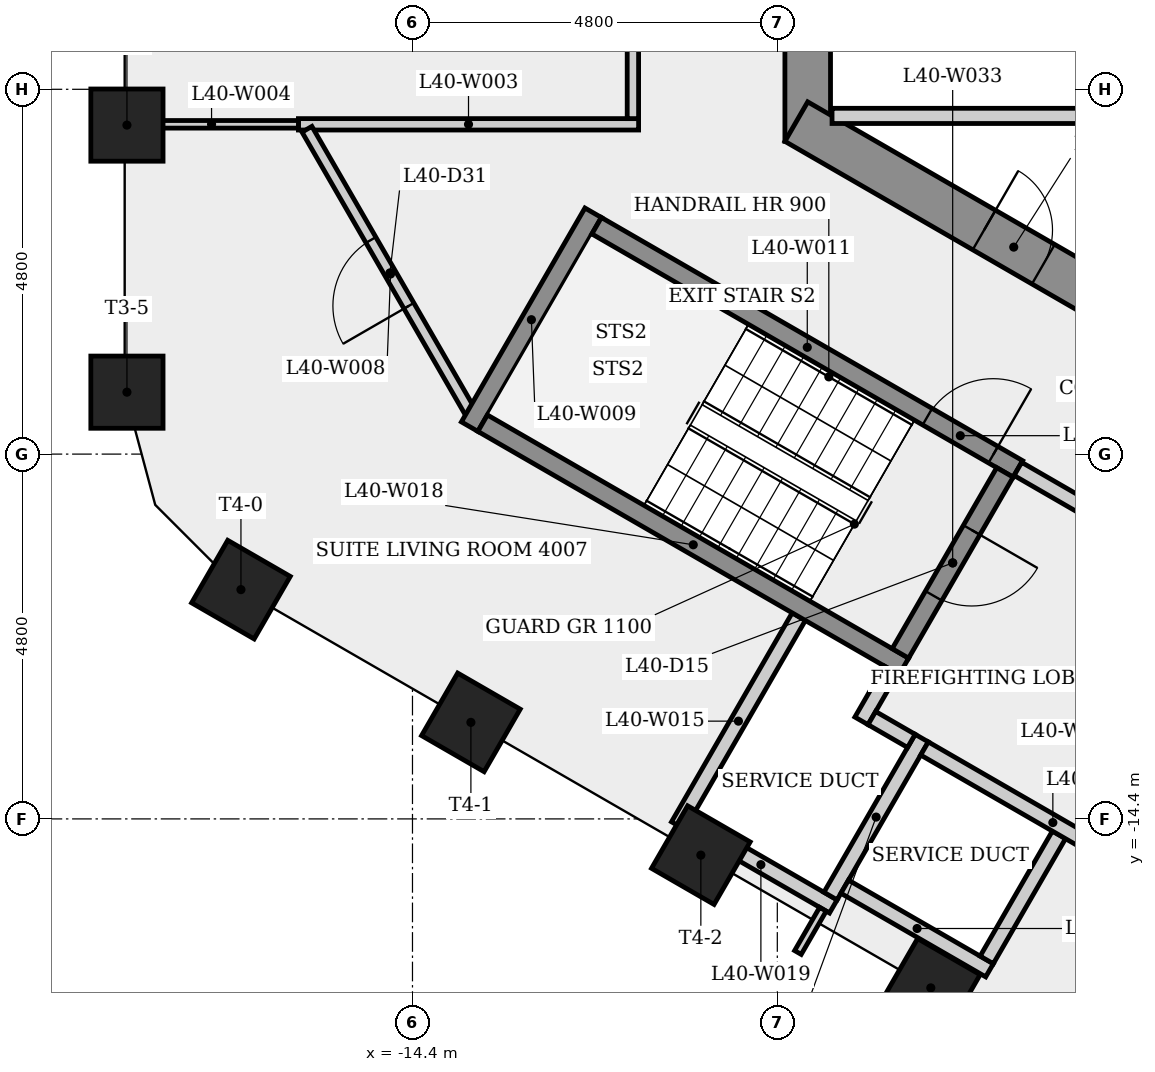
"""IFC4 building model, lengths in metres.
Left out: names, types, materials, properties, quantities, classifications, styles, units other than length and angle.
Written with IfcOpenShell. Run it as: python <this file> out.ifc"""

import sys

from ifc_helpers import new_model, si_unit, direction, frame, frame_2d, origin, origin_2d, place, context, subcontext, project, spatial, rectangle, extrude, element, fill, save


model = new_model("IFC4")
c1 = context("Model", 3, precision=1e-05, world=origin(), true_north=direction((0.0, 1.0)))
c2 = subcontext(c1, "Body", "Model", "MODEL_VIEW")
j1 = project(units=[si_unit("LENGTHUNIT", "METRE"), si_unit("PLANEANGLEUNIT", "RADIAN")], contexts=[c1])
p1 = place(None, origin())
s1 = spatial("IfcSite", under=j1, at=p1, CompositionType="ELEMENT")
p2 = place(p1, origin())
s2 = spatial("IfcBuilding", under=s1, at=p2, CompositionType="ELEMENT")
p3 = place(p2, frame((0.0, 0.0, 152.7)))
s3 = spatial("IfcBuildingStorey", under=s2, at=p3, CompositionType="ELEMENT", Elevation=152.7)
p4 = place(p3, frame((-9.2, 5.485, 0.0), z_axis=(0.0, 0.0, 1.0), x_axis=(0.0, -1.0, 0.0)))
e1 = element("IfcWall", 1, at=p4, inside=s3, PredefinedType="SHEAR", context=c2, shape_type="SweptSolid", body=[
    extrude(rectangle(XDim=10.97, YDim=0.6, at=frame_2d((5.485, 0.0))), origin(), (0.0, 0.0, 1.0), 3.4),
])
p5 = place(p4, frame((8.516, 0.0, 0.0)))
e2 = element("IfcOpeningElement", 2, at=p5, cuts=e1, PredefinedType="OPENING", context=c2, shape_type="SweptSolid", body=[
    extrude(rectangle(XDim=0.9, YDim=2.1, at=frame_2d((0.45, 1.05))), frame((0.0, 0.31, 0.0), z_axis=(0.0, -1.0, 0.0), x_axis=(1.0, 0.0, 0.0)), (0.0, 0.0, 1.0), 0.62),
])
p6 = place(p4, frame((4.685, 0.0, 0.0)))
e3 = element("IfcOpeningElement", 3, at=p6, cuts=e1, PredefinedType="OPENING", context=c2, shape_type="SweptSolid", body=[
    extrude(rectangle(XDim=1.6, YDim=2.1, at=frame_2d((0.8, 1.05))), frame((0.0, 0.31, 0.0), z_axis=(0.0, -1.0, 0.0), x_axis=(1.0, 0.0, 0.0)), (0.0, 0.0, 1.0), 0.62),
])
p7 = place(p3, frame((-9.35, -5.225, 0.0), z_axis=(0.0, 0.0, 1.0), x_axis=(0.866023993627, -0.500002442456, 0.0)))
e4 = element("IfcWall", 4, at=p7, inside=s3, PredefinedType="SHEAR", context=c2, shape_type="SweptSolid", body=[
    extrude(rectangle(XDim=10.97, YDim=0.6, at=frame_2d((5.485, 0.0))), origin(), (0.0, 0.0, 1.0), 3.4),
])
p8 = place(p7, frame((2.853, 0.0, 0.0)))
e5 = element("IfcOpeningElement", 5, at=p8, cuts=e4, PredefinedType="OPENING", context=c2, shape_type="SweptSolid", body=[
    extrude(rectangle(XDim=0.9, YDim=2.1, at=frame_2d((0.45, 1.05))), frame((0.0, 0.31, 0.0), z_axis=(0.0, -1.0, 0.0), x_axis=(1.0, 0.0, 0.0)), (0.0, 0.0, 1.0), 0.62),
])
for number, where, z_axis, x_axis in (
    (6, (-18.157, -5.271, 0.0), (0.0, 0.0, 1.0), (-1.0, 0.0, 0.0)),
    (7, (-18.157, -8.785, 0.0), (0.0, 0.0, 1.0), (-1.0, 0.0, 0.0)),
    (8, (-16.657, -11.383, 0.0), (0.0, 0.0, 1.0), (-0.5, -0.866, 0.0)),
    (9, (-13.631, -13.13, 0.0), (0.0, 0.0, 1.0), (-0.5, -0.866, 0.0)),
    (10, (-10.606, -14.877, 0.0), (0.0, 0.0, 1.0), (-0.5, -0.866, 0.0)),
    (11, (-7.581, -16.623, 0.0), (0.0, 0.0, 1.0), (-0.5, -0.866, 0.0)),
):
    element("IfcColumn", number, at=place(p3, frame(where, z_axis=z_axis, x_axis=x_axis)), inside=s3, PredefinedType="COLUMN", context=c2, shape_type="SweptSolid", body=[
        extrude(rectangle(XDim=0.95, YDim=0.95, at=origin_2d()), origin(), (0.0, 0.0, 1.0), 3.4),
    ])
p9 = place(p3, frame((-15.901, -5.261, 0.0), z_axis=(0.0, 0.0, 1.0), x_axis=(1.0, 0.0, 0.0)))
e12 = element("IfcWall", 12, at=p9, inside=s3, PredefinedType="PARTITIONING", context=c2, shape_type="SweptSolid", body=[
    extrude(rectangle(XDim=4.476, YDim=0.15, at=frame_2d((2.238, 0.0))), origin(), (0.0, 0.0, 1.0), 3.05),
])
p10 = place(p3, frame((-15.901, -5.261, 0.0), z_axis=(0.0, 0.0, 1.0), x_axis=(-1.0, 0.0, 0.0)))
e13 = element("IfcWall", 13, at=p10, inside=s3, PredefinedType="PARTITIONING", context=c2, shape_type="SweptSolid", body=[
    extrude(rectangle(XDim=2.286, YDim=0.1, at=frame_2d((1.143, 0.0))), origin(), (0.0, 0.0, 1.0), 3.05),
])
p11 = place(p3, frame((-13.588, -9.136, 0.0), z_axis=(0.0, 0.0, 1.0), x_axis=(-0.50001224981, 0.866018331238, 0.0)))
e14 = element("IfcWall", 14, at=p11, inside=s3, PredefinedType="PARTITIONING", context=c2, shape_type="SweptSolid", body=[
    extrude(rectangle(XDim=4.4, YDim=0.15, at=frame_2d((2.2, 0.0))), origin(), (0.0, 0.0, 1.0), 3.05),
])
p12 = place(p11, frame((1.717, 0.0, 0.0)))
e15 = element("IfcOpeningElement", 15, at=p12, cuts=e14, PredefinedType="OPENING", context=c2, shape_type="SweptSolid", body=[
    extrude(rectangle(XDim=1.0, YDim=2.1, at=frame_2d((0.5, 1.05))), frame((0.0, 0.085, 0.0), z_axis=(0.0, -1.0, 0.0), x_axis=(1.0, 0.0, 0.0)), (0.0, 0.0, 1.0), 0.17),
])
p13 = place(p3, frame((-13.648, -9.239, 0.0), z_axis=(0.0, 0.0, 1.0), x_axis=(0.500017246033, 0.866015446554, 0.0)))
e16 = element("IfcWall", 16, at=p13, inside=s3, PredefinedType="SHEAR", context=c2, shape_type="SweptSolid", body=[
    extrude(rectangle(XDim=3.25, YDim=0.25, at=frame_2d((1.625, 0.0))), origin(), (0.0, 0.0, 1.0), 3.05),
])
p14 = place(p3, frame((-11.977, -6.595, 0.0), z_axis=(0.0, 0.0, 1.0), x_axis=(0.866025499775, -0.499999833739, 0.0)))
e17 = element("IfcWall", 17, at=p14, inside=s3, PredefinedType="SHEAR", context=c2, shape_type="SweptSolid", body=[
    extrude(rectangle(XDim=6.4, YDim=0.25, at=frame_2d((3.2, 0.0))), origin(), (0.0, 0.0, 1.0), 3.05),
])
p15 = place(p14, frame((5.025, 0.0, 0.0)))
e18 = element("IfcOpeningElement", 18, at=p15, cuts=e17, PredefinedType="OPENING", context=c2, shape_type="SweptSolid", body=[
    extrude(rectangle(XDim=1.0, YDim=2.1, at=frame_2d((0.5, 1.05))), frame((0.0, 0.135, 0.0), z_axis=(0.0, -1.0, 0.0), x_axis=(1.0, 0.0, 0.0)), (0.0, 0.0, 1.0), 0.27),
])
p16 = place(p3, frame((-11.5, -5.186, 0.0), z_axis=(0.0, 0.0, 1.0), x_axis=(0.0, 1.0, 0.0)))
e19 = element("IfcWall", 19, at=p16, inside=s3, PredefinedType="PARTITIONING", context=c2, shape_type="SweptSolid", body=[
    extrude(rectangle(XDim=10.521, YDim=0.15, at=frame_2d((5.261, 0.0))), origin(), (0.0, 0.0, 1.0), 3.05),
])
p17 = place(p16, frame((9.146, 0.0, 0.0)))
e20 = element("IfcOpeningElement", 20, at=p17, cuts=e19, PredefinedType="OPENING", context=c2, shape_type="SweptSolid", body=[
    extrude(rectangle(XDim=0.9, YDim=2.1, at=frame_2d((0.45, 1.05))), frame((0.0, 0.085, 0.0), z_axis=(0.0, -1.0, 0.0), x_axis=(1.0, 0.0, 0.0)), (0.0, 0.0, 1.0), 0.17),
])
p18 = place(p16, frame((2.955, 0.0, 0.0)))
e21 = element("IfcOpeningElement", 21, at=p18, cuts=e19, PredefinedType="OPENING", context=c2, shape_type="SweptSolid", body=[
    extrude(rectangle(XDim=1.0, YDim=2.1, at=frame_2d((0.5, 1.05))), frame((0.0, 0.085, 0.0), z_axis=(0.0, -1.0, 0.0), x_axis=(1.0, 0.0, 0.0)), (0.0, 0.0, 1.0), 0.17),
])
p19 = place(p3, frame((-10.905, -14.489, 0.0), z_axis=(0.0, 0.0, 1.0), x_axis=(0.499959856469, 0.866048579423, 0.0)))
e22 = element("IfcWall", 22, at=p19, inside=s3, PredefinedType="PLUMBINGWALL", context=c2, shape_type="SweptSolid", body=[
    extrude(rectangle(XDim=3.175, YDim=0.2, at=frame_2d((1.587, 0.0))), origin(), (0.0, 0.0, 1.0), 3.05),
])
p20 = place(p3, frame((-13.477, -9.193, 0.0), z_axis=(0.0, 0.0, 1.0), x_axis=(0.866025499775, -0.499999833739, 0.0)))
e23 = element("IfcWall", 23, at=p20, inside=s3, PredefinedType="SHEAR", context=c2, shape_type="SweptSolid", body=[
    extrude(rectangle(XDim=6.4, YDim=0.25, at=frame_2d((3.2, 0.0))), origin(), (0.0, 0.0, 1.0), 3.05),
])
p21 = place(p3, frame((-8.863, -15.552, 0.0), z_axis=(0.0, 0.0, 1.0), x_axis=(-0.866035918664, 0.499981787252, 0.0)))
e24 = element("IfcWall", 24, at=p21, inside=s3, PredefinedType="PLUMBINGWALL", context=c2, shape_type="SweptSolid", body=[
    extrude(rectangle(XDim=2.2, YDim=0.2, at=frame_2d((1.1, 0.0))), origin(), (0.0, 0.0, 1.0), 3.05),
])
p22 = place(p3, frame((-9.0, -15.588, 0.0), z_axis=(0.0, 0.0, 1.0), x_axis=(-0.500011643316, -0.866018681408, 0.0)))
e25 = element("IfcWall", 25, at=p22, inside=s3, PredefinedType="PARTITIONING", context=c2, shape_type="SweptSolid", body=[
    extrude(rectangle(XDim=0.658, YDim=0.1, at=frame_2d((0.329, 0.0))), origin(), (0.0, 0.0, 1.0), 3.05),
])
p23 = place(p3, frame((-8.88, -5.15, 0.0), z_axis=(0.0, 0.0, 1.0), x_axis=(1.0, 0.0, 0.0)))
e26 = element("IfcWall", 26, at=p23, inside=s3, PredefinedType="PARTITIONING", context=c2, shape_type="SweptSolid", body=[
    extrude(rectangle(XDim=11.205, YDim=0.2, at=frame_2d((5.603, 0.0))), origin(), (0.0, 0.0, 1.0), 3.05),
])
p24 = place(p3, frame((-8.493, -13.11, 0.0), z_axis=(0.0, 0.0, 1.0), x_axis=(0.500067724834, 0.865986299303, 0.0)))
e27 = element("IfcWall", 27, at=p24, inside=s3, PredefinedType="PLUMBINGWALL", context=c2, shape_type="SweptSolid", body=[
    extrude(rectangle(XDim=0.775, YDim=0.2, at=frame_2d((0.388, 0.0))), origin(), (0.0, 0.0, 1.0), 3.05),
])
p25 = place(p3, frame((-7.7, -13.337, 0.0), z_axis=(0.0, 0.0, 1.0), x_axis=(-0.500001309137, -0.866024647952, 0.0)))
e28 = element("IfcWall", 28, at=p25, inside=s3, PredefinedType="PLUMBINGWALL", context=c2, shape_type="SweptSolid", body=[
    extrude(rectangle(XDim=2.4, YDim=0.2, at=frame_2d((1.2, 0.0))), origin(), (0.0, 0.0, 1.0), 3.05),
])
p26 = place(p3, frame((-7.836, -13.373, 0.0), z_axis=(0.0, 0.0, 1.0), x_axis=(-0.866232998003, 0.499640263761, 0.0)))
e29 = element("IfcWall", 29, at=p26, inside=s3, PredefinedType="PLUMBINGWALL", context=c2, shape_type="SweptSolid", body=[
    extrude(rectangle(XDim=0.6, YDim=0.2, at=frame_2d((0.3, 0.0))), origin(), (0.0, 0.0, 1.0), 3.05),
])
p27 = place(p3, frame((-6.808, -16.392, 0.0), z_axis=(0.0, 0.0, 1.0), x_axis=(-0.866008176907, 0.50002983664, 0.0)))
e30 = element("IfcWall", 30, at=p27, inside=s3, PredefinedType="PLUMBINGWALL", context=c2, shape_type="SweptSolid", body=[
    extrude(rectangle(XDim=2.2, YDim=0.2, at=frame_2d((1.1, 0.0))), origin(), (0.0, 0.0, 1.0), 3.05),
])
p28 = place(p3, frame((-6.605, -9.841, 0.0), z_axis=(0.0, 0.0, 1.0), x_axis=(-0.499996545922, -0.866027397988, 0.0)))
e31 = element("IfcWall", 31, at=p28, inside=s3, PredefinedType="SHEAR", context=c2, shape_type="SweptSolid", body=[
    extrude(rectangle(XDim=2.75, YDim=0.25, at=frame_2d((1.375, 0.0))), origin(), (0.0, 0.0, 1.0), 3.05),
])
p29 = place(p28, frame((0.875, 0.0, 0.0)))
e32 = element("IfcOpeningElement", 32, at=p29, cuts=e31, PredefinedType="OPENING", context=c2, shape_type="SweptSolid", body=[
    extrude(rectangle(XDim=1.0, YDim=2.1, at=frame_2d((0.5, 1.05))), frame((0.0, 0.135, 0.0), z_axis=(0.0, -1.0, 0.0), x_axis=(1.0, 0.0, 0.0)), (0.0, 0.0, 1.0), 0.27),
])
p30 = place(p3, frame((-6.435, -9.795, 0.0), z_axis=(0.0, 0.0, 1.0), x_axis=(0.866012907634, -0.500021643343, 0.0)))
e33 = element("IfcWall", 33, at=p30, inside=s3, PredefinedType="PARTITIONING", context=c2, shape_type="SweptSolid", body=[
    extrude(rectangle(XDim=4.45, YDim=0.2, at=frame_2d((2.225, 0.0))), origin(), (0.0, 0.0, 1.0), 3.05),
])
p31 = place(p30, frame((1.675, 0.0, 0.0)))
e34 = element("IfcOpeningElement", 34, at=p31, cuts=e33, PredefinedType="OPENING", context=c2, shape_type="SweptSolid", body=[
    extrude(rectangle(XDim=1.1, YDim=2.1, at=frame_2d((0.55, 1.05))), frame((0.0, 0.11, 0.0), z_axis=(0.0, -1.0, 0.0), x_axis=(1.0, 0.0, 0.0)), (0.0, 0.0, 1.0), 0.22),
])
p32 = place(p3, frame((-5.895, -14.61, 0.0), z_axis=(0.0, 0.0, 1.0), x_axis=(-0.500022797313, -0.86601224135, 0.0)))
e35 = element("IfcWall", 35, at=p32, inside=s3, PredefinedType="PLUMBINGWALL", context=c2, shape_type="SweptSolid", body=[
    extrude(rectangle(XDim=1.9, YDim=0.2, at=frame_2d((0.95, 0.0))), origin(), (0.0, 0.0, 1.0), 3.05),
])
p33 = place(p3, frame((-4.286, -15.423, 0.0), z_axis=(0.0, 0.0, 1.0), x_axis=(-0.866042777325, 0.499969906938, 0.0)))
e36 = element("IfcWall", 36, at=p33, inside=s3, PredefinedType="PARTITIONING", context=c2, shape_type="SweptSolid", body=[
    extrude(rectangle(XDim=3.9, YDim=0.2, at=frame_2d((1.95, 0.0))), origin(), (0.0, 0.0, 1.0), 3.05),
])
p34 = place(p15, origin())
e37 = element("IfcDoor", 37, at=p34, inside=s3, OperationType="SINGLE_SWING_RIGHT", PredefinedType="DOOR", context=c2, shape_type="SweptSolid", body=[
    extrude(rectangle(XDim=1.0, YDim=2.1, at=frame_2d((0.5, 1.05))), frame((0.0, 0.025, 0.0), z_axis=(0.0, -1.0, 0.0), x_axis=(1.0, 0.0, 0.0)), (0.0, 0.0, 1.0), 0.05),
])
fill(e18, e37)
p35 = place(p29, origin())
e38 = element("IfcDoor", 38, at=p35, inside=s3, OperationType="SINGLE_SWING_LEFT", PredefinedType="DOOR", context=c2, shape_type="SweptSolid", body=[
    extrude(rectangle(XDim=1.0, YDim=2.1, at=frame_2d((0.5, 1.05))), frame((0.0, 0.025, 0.0), z_axis=(0.0, -1.0, 0.0), x_axis=(1.0, 0.0, 0.0)), (0.0, 0.0, 1.0), 0.05),
])
fill(e32, e38)
p36 = place(p12, origin())
e39 = element("IfcDoor", 39, at=p36, inside=s3, OperationType="SINGLE_SWING_LEFT", PredefinedType="DOOR", context=c2, shape_type="SweptSolid", body=[
    extrude(rectangle(XDim=1.0, YDim=2.1, at=frame_2d((0.5, 1.05))), frame((0.0, 0.025, 0.0), z_axis=(0.0, -1.0, 0.0), x_axis=(1.0, 0.0, 0.0)), (0.0, 0.0, 1.0), 0.05),
])
fill(e15, e39)
p37 = place(p8, origin())
e40 = element("IfcDoor", 40, at=p37, inside=s3, OperationType="SINGLE_SWING_LEFT", PredefinedType="DOOR", context=c2, shape_type="SweptSolid", body=[
    extrude(rectangle(XDim=0.9, YDim=2.1, at=frame_2d((0.45, 1.05))), frame((0.0, 0.025, 0.0), z_axis=(0.0, -1.0, 0.0), x_axis=(1.0, 0.0, 0.0)), (0.0, 0.0, 1.0), 0.05),
])
fill(e5, e40)
save(model, sys.argv[1])
